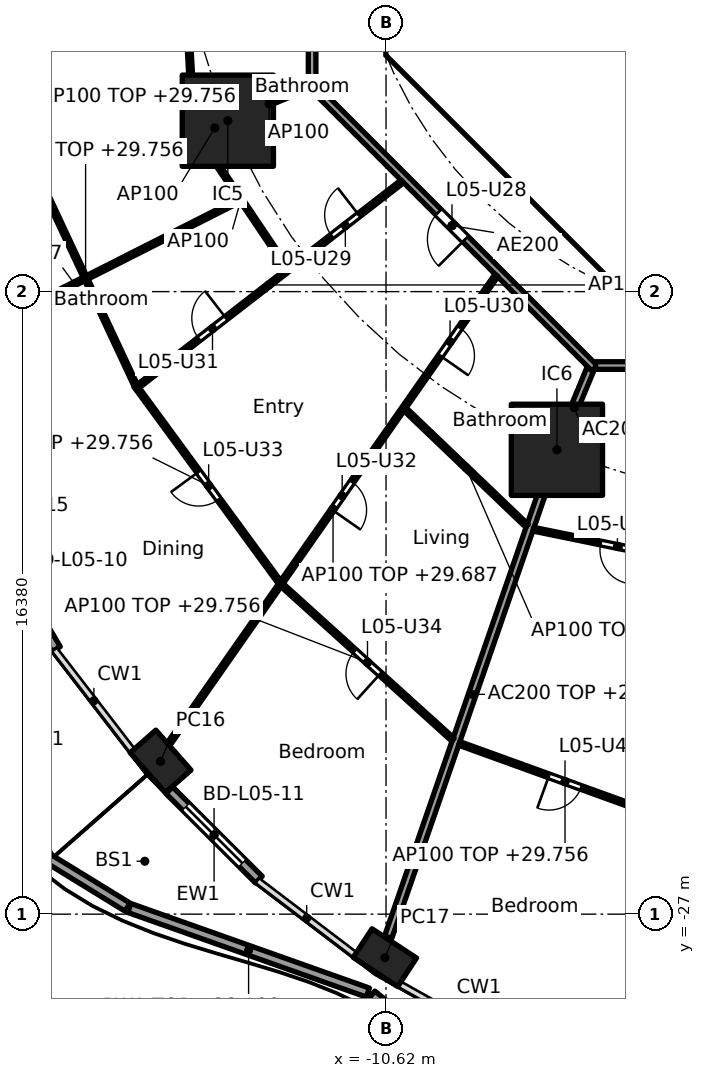
"""IFC4 building model, lengths in metres.
Left out: names, types, materials, properties, quantities, classifications, styles, units other than length and angle.
Written with IfcOpenShell. Run it as: python <this file> out.ifc"""

import sys

from ifc_helpers import new_model, si_unit, direction, frame, frame_2d, origin, origin_2d, place, context, subcontext, project, spatial, polyline, rectangle, hollow_rectangle, outline, extrude, element, fill, save


model = new_model("IFC4")
c1 = context("Model", 3, precision=1e-05, world=origin(), true_north=direction((0.0, 1.0)))
c2 = subcontext(c1, "Body", "Model", "MODEL_VIEW")
j1 = project(units=[si_unit("LENGTHUNIT", "METRE"), si_unit("PLANEANGLEUNIT", "RADIAN")], contexts=[c1])
p1 = place(None, origin())
s1 = spatial("IfcSite", under=j1, at=p1, CompositionType="ELEMENT")
p2 = place(p1, origin())
s2 = spatial("IfcBuilding", under=s1, at=p2, CompositionType="ELEMENT")
p3 = place(p2, frame((0.0, 0.0, 27.0)))
s3 = spatial("IfcBuildingStorey", under=s2, at=p3, CompositionType="ELEMENT", Elevation=27.0)
for number, where, z_axis, x_axis in (
    (1, (-16.552, -22.981, 0.0), (0.0, 0.0, 1.0), (0.66, -0.751, 0.0)),
    (2, (-10.65, -28.146, 0.0), (0.0, 0.0, 1.0), (0.836, -0.549, 0.0)),
):
    element("IfcColumn", number, at=place(p3, frame(where, z_axis=z_axis, x_axis=x_axis)), inside=s3, PredefinedType="COLUMN", context=c2, shape_type="SweptSolid", body=[
        extrude(hollow_rectangle(XDim=1.4, YDim=0.9, WallThickness=0.05, at=origin_2d()), origin(), (0.0, 0.0, 1.0), 3.7),
    ])
for number, where, z_axis, x_axis in (
    (3, (-14.782, -6.123, 0.0), (0.0, 0.0, 1.0), (1.0, 0.0, 0.0)),
    (4, (-6.123, -14.782, 0.0), (0.0, 0.0, 1.0), (1.0, 0.0, 0.0)),
):
    element("IfcColumn", number, at=place(p3, frame(where, z_axis=z_axis, x_axis=x_axis)), inside=s3, PredefinedType="COLUMN", context=c2, shape_type="SweptSolid", body=[
        extrude(rectangle(XDim=2.4, YDim=2.4, at=origin_2d()), origin(), (0.0, 0.0, 1.0), 3.7),
    ])
p4 = place(p3, frame((-19.3, -20.026, 0.0), z_axis=(0.0, 0.0, 1.0), x_axis=(-0.506311160839, 0.862350861546, 0.0)))
e5 = element("IfcWall", 5, at=p4, inside=s3, PredefinedType="SOLIDWALL", context=c2, shape_type="SweptSolid", body=[
    extrude(rectangle(XDim=3.462, YDim=0.25, at=frame_2d((1.731, 0.0))), origin(), (0.0, 0.0, 1.0), 3.44),
])
p5 = place(p4, frame((0.681, 0.0, 0.0)))
e6 = element("IfcOpeningElement", 6, at=p5, cuts=e5, PredefinedType="OPENING", context=c2, shape_type="SweptSolid", body=[
    extrude(rectangle(XDim=2.1, YDim=2.4, at=frame_2d((1.05, 1.2))), frame((0.0, 0.135, 0.0), z_axis=(0.0, -1.0, 0.0), x_axis=(1.0, 0.0, 0.0)), (0.0, 0.0, 1.0), 0.27),
])
p6 = place(p3, frame((-13.966, -26.092, 0.0), z_axis=(0.0, 0.0, 1.0), x_axis=(-0.707803094595, 0.706409781417, 0.0)))
e7 = element("IfcWall", 7, at=p6, inside=s3, PredefinedType="SOLIDWALL", context=c2, shape_type="SweptSolid", body=[
    extrude(rectangle(XDim=3.329, YDim=0.25, at=frame_2d((1.665, 0.0))), origin(), (0.0, 0.0, 1.0), 3.44),
])
p7 = place(p6, frame((0.615, 0.0, 0.0)))
e8 = element("IfcOpeningElement", 8, at=p7, cuts=e7, PredefinedType="OPENING", context=c2, shape_type="SweptSolid", body=[
    extrude(rectangle(XDim=2.1, YDim=2.4, at=frame_2d((1.05, 1.2))), frame((0.0, 0.135, 0.0), z_axis=(0.0, -1.0, 0.0), x_axis=(1.0, 0.0, 0.0)), (0.0, 0.0, 1.0), 0.27),
])
p8 = place(p3, frame((-21.34, -22.818, 0.0), z_axis=(0.0, 0.0, 1.0), x_axis=(0.56093486479, -0.827859938312, 0.0)))
e9 = element("IfcWall", 9, at=p8, inside=s3, PredefinedType="PARAPET", context=c2, shape_type="SweptSolid", body=[
    extrude(rectangle(XDim=3.299, YDim=0.25, at=frame_2d((1.649, 0.0))), origin(), (0.0, 0.0, 1.0), 1.1),
])
p9 = place(p3, frame((-19.491, -25.545, 0.0), z_axis=(0.0, 0.0, 1.0), x_axis=(0.852196394013, -0.523222042761, 0.0)))
e10 = element("IfcWall", 10, at=p9, inside=s3, PredefinedType="PARAPET", context=c2, shape_type="SweptSolid", body=[
    extrude(rectangle(XDim=2.428, YDim=0.25, at=frame_2d((1.214, 0.0))), origin(), (0.0, 0.0, 1.0), 1.1),
])
p10 = place(p3, frame((-17.373, -26.838, 0.0), z_axis=(0.0, 0.0, 1.0), x_axis=(0.94252427227, -0.334137690453, 0.0)))
e11 = element("IfcWall", 11, at=p10, inside=s3, PredefinedType="PARAPET", context=c2, shape_type="SweptSolid", body=[
    extrude(rectangle(XDim=6.657, YDim=0.25, at=frame_2d((3.329, 0.0))), origin(), (0.0, 0.0, 1.0), 1.1),
])
p11 = place(p3, frame((-10.993, -29.122, 0.0), z_axis=(0.0, 0.0, 1.0), x_axis=(0.777298307168, -0.62913221319, 0.0)))
e12 = element("IfcWall", 12, at=p11, inside=s3, PredefinedType="PARAPET", context=c2, shape_type="SweptSolid", body=[
    extrude(rectangle(XDim=3.937, YDim=0.25, at=frame_2d((1.968, 0.0))), origin(), (0.0, 0.0, 1.0), 1.1),
])
p12 = place(p3, frame((-9.988, -4.613, 0.0), z_axis=(0.0, 0.0, 1.0), x_axis=(0.707106781187, -0.707106781187, 0.0)))
e13 = element("IfcWall", 13, at=p12, inside=s3, PredefinedType="SHEAR", context=c2, shape_type="SweptSolid", body=[
    extrude(rectangle(XDim=7.602, YDim=0.6, at=frame_2d((3.801, 0.0))), origin(), (0.0, 0.0, 1.0), 3.44),
])
p13 = place(p12, frame((6.151, 0.0, 0.0)))
e14 = element("IfcOpeningElement", 14, at=p13, cuts=e13, PredefinedType="OPENING", context=c2, shape_type="SweptSolid", body=[
    extrude(rectangle(XDim=1.1, YDim=2.1, at=frame_2d((0.55, 1.05))), frame((0.0, 0.31, 0.0), z_axis=(0.0, -1.0, 0.0), x_axis=(1.0, 0.0, 0.0)), (0.0, 0.0, 1.0), 0.62),
])
p14 = place(p3, frame((-5.8, -8.227, 0.0), z_axis=(0.0, 0.0, 1.0), x_axis=(0.0, 1.0, 0.0)))
e15 = element("IfcWall", 15, at=p14, inside=s3, PredefinedType="PARTITIONING", context=c2, shape_type="SweptSolid", body=[
    extrude(rectangle(XDim=3.927, YDim=0.15, at=frame_2d((1.963, 0.0))), origin(), (0.0, 0.0, 1.0), 3.44),
])
p15 = place(p14, frame((2.615, 0.0, 0.0)))
e16 = element("IfcOpeningElement", 16, at=p15, cuts=e15, PredefinedType="OPENING", context=c2, shape_type="SweptSolid", body=[
    extrude(rectangle(XDim=0.9, YDim=2.1, at=frame_2d((0.45, 1.05))), frame((0.0, 0.085, 0.0), z_axis=(0.0, -1.0, 0.0), x_axis=(1.0, 0.0, 0.0)), (0.0, 0.0, 1.0), 0.17),
])
p16 = place(p14, frame((0.539, 0.0, 0.0)))
e17 = element("IfcOpeningElement", 17, at=p16, cuts=e15, PredefinedType="OPENING", context=c2, shape_type="SweptSolid", body=[
    extrude(rectangle(XDim=0.9, YDim=2.1, at=frame_2d((0.45, 1.05))), frame((0.0, 0.085, 0.0), z_axis=(0.0, -1.0, 0.0), x_axis=(1.0, 0.0, 0.0)), (0.0, 0.0, 1.0), 0.17),
])
p17 = place(p3, origin())
e18 = element("IfcWall", 18, at=p17, inside=s3, PredefinedType="SHEAR", context=c2, shape_type="SweptSolid", body=[
    extrude(outline(polyline([(-10.625, -3.801), (-10.025, -3.801), (-10.025, -4.152), (-9.776, -4.401), (-10.2, -4.825), (-10.625, -4.401), (-10.625, -3.801)])), origin(), (0.0, 0.0, 1.0), 3.44),
])
p18 = place(p3, origin())
e19 = element("IfcWall", 19, at=p18, inside=s3, PredefinedType="SHEAR", context=c2, shape_type="SweptSolid", body=[
    extrude(outline(polyline([(-4.152, -10.025), (4.152, -10.025), (4.401, -9.776), (4.825, -10.2), (4.401, -10.625), (-4.401, -10.625), (-4.825, -10.2), (-4.401, -9.776), (-4.152, -10.025)])), origin(), (0.0, 0.0, 1.0), 3.44),
])
p19 = place(p3, frame((-8.001, -6.1, 0.0), z_axis=(0.0, 0.0, 1.0), x_axis=(1.0, 0.0, 0.0)))
e20 = element("IfcWall", 20, at=p19, inside=s3, PredefinedType="PARTITIONING", context=c2, shape_type="SweptSolid", body=[
    extrude(rectangle(XDim=2.126, YDim=0.15, at=frame_2d((1.063, 0.0))), origin(), (0.0, 0.0, 1.0), 3.44),
])
p20 = place(p3, frame((-5.243, -12.657, 0.0), z_axis=(0.0, 0.0, 1.0), x_axis=(-0.382668627144, -0.923885664896, 0.0)))
e21 = element("IfcWall", 21, at=p20, inside=s3, PredefinedType="PARTITIONING", context=c2, shape_type="SweptSolid", body=[
    extrude(rectangle(XDim=2.2, YDim=0.2, at=frame_2d((1.1, 0.0))), origin(), (0.0, 0.0, 1.0), 3.44),
])
p21 = place(p3, frame((-6.139, -14.829, 0.0), z_axis=(0.0, 0.0, 1.0), x_axis=(-0.327178799566, -0.944962450637, 0.0)))
e22 = element("IfcWall", 22, at=p21, inside=s3, PredefinedType="PARTITIONING", context=c2, shape_type="SweptSolid", body=[
    extrude(rectangle(XDim=13.517, YDim=0.2, at=frame_2d((6.759, 0.0))), origin(), (0.0, 0.0, 1.0), 2.756),
])
p22 = place(p3, frame((-12.565, 5.304, 0.0), z_axis=(0.0, 0.0, 1.0), x_axis=(0.0, -1.0, 0.0)))
e23 = element("IfcWall", 23, at=p22, inside=s3, PredefinedType="PARTITIONING", context=c2, shape_type="SweptSolid", body=[
    extrude(rectangle(XDim=10.409, YDim=0.2, at=frame_2d((5.205, 0.0))), origin(), (0.0, 0.0, 1.0), 3.44),
])
p23 = place(p3, frame((-12.635, -5.134, 0.0), z_axis=(0.0, 0.0, 1.0), x_axis=(0.707106781187, -0.707106781187, 0.0)))
e24 = element("IfcWall", 24, at=p23, inside=s3, PredefinedType="PARTITIONING", context=c2, shape_type="SweptSolid", body=[
    extrude(rectangle(XDim=10.609, YDim=0.2, at=frame_2d((5.305, 0.0))), origin(), (0.0, 0.0, 1.0), 3.44),
])
p24 = place(p23, frame((4.804, 0.0, 0.0)))
e25 = element("IfcOpeningElement", 25, at=p24, cuts=e24, PredefinedType="OPENING", context=c2, shape_type="SweptSolid", body=[
    extrude(rectangle(XDim=1.0, YDim=2.1, at=frame_2d((0.5, 1.05))), frame((0.0, 0.11, 0.0), z_axis=(0.0, -1.0, 0.0), x_axis=(1.0, 0.0, 0.0)), (0.0, 0.0, 1.0), 0.22),
])
p25 = place(p3, frame((-5.104, -12.565, 0.0), z_axis=(0.0, 0.0, 1.0), x_axis=(1.0, 0.0, 0.0)))
e26 = element("IfcWall", 26, at=p25, inside=s3, PredefinedType="PARTITIONING", context=c2, shape_type="SweptSolid", body=[
    extrude(rectangle(XDim=10.409, YDim=0.2, at=frame_2d((5.205, 0.0))), origin(), (0.0, 0.0, 1.0), 3.44),
])
p26 = place(p25, frame((8.074, 0.0, 0.0)))
e27 = element("IfcOpeningElement", 27, at=p26, cuts=e26, PredefinedType="OPENING", context=c2, shape_type="SweptSolid", body=[
    extrude(rectangle(XDim=1.0, YDim=2.1, at=frame_2d((0.5, 1.05))), frame((0.0, 0.11, 0.0), z_axis=(0.0, -1.0, 0.0), x_axis=(1.0, 0.0, 0.0)), (0.0, 0.0, 1.0), 0.22),
])
p27 = place(p3, frame((-16.028, -0.05, 0.0), z_axis=(0.0, 0.0, 1.0), x_axis=(0.054636410342, -0.998506315786, 0.0)))
e28 = element("IfcWall", 28, at=p27, inside=s3, PredefinedType="PARTITIONING", context=c2, shape_type="SweptSolid", body=[
    extrude(rectangle(XDim=6.359, YDim=0.1, at=frame_2d((3.179, 0.0))), origin(), (0.0, 0.0, 1.0), 2.756),
])
p28 = place(p27, frame((2.704, 0.0, 0.0)))
e29 = element("IfcOpeningElement", 29, at=p28, cuts=e28, PredefinedType="OPENING", context=c2, shape_type="SweptSolid", body=[
    extrude(rectangle(XDim=0.9, YDim=2.1, at=frame_2d((0.45, 1.05))), frame((0.0, 0.06, 0.0), z_axis=(0.0, -1.0, 0.0), x_axis=(1.0, 0.0, 0.0)), (0.0, 0.0, 1.0), 0.12),
])
p29 = place(p3, frame((-12.657, -5.243, 0.0), z_axis=(0.0, 0.0, 1.0), x_axis=(-0.923864733477, -0.382719158442, 0.0)))
e30 = element("IfcWall", 30, at=p29, inside=s3, PredefinedType="PARTITIONING", context=c2, shape_type="SweptSolid", body=[
    extrude(rectangle(XDim=2.25, YDim=0.1, at=frame_2d((1.125, 0.0))), origin(), (0.0, 0.0, 1.0), 3.44),
])
p30 = place(p3, frame((-15.655, -6.391, 0.0), z_axis=(0.0, 0.0, 1.0), x_axis=(0.559126445155, -0.82908239538, 0.0)))
e31 = element("IfcWall", 31, at=p30, inside=s3, PredefinedType="PARTITIONING", context=c2, shape_type="SweptSolid", body=[
    extrude(rectangle(XDim=4.358, YDim=0.1, at=frame_2d((2.179, 0.0))), origin(), (0.0, 0.0, 1.0), 3.44),
])
p31 = place(p3, frame((-19.847, -7.445, 0.0), z_axis=(0.0, 0.0, 1.0), x_axis=(0.423892287987, -0.905712607942, 0.0)))
e32 = element("IfcWall", 32, at=p31, inside=s3, PredefinedType="PARTITIONING", context=c2, shape_type="SweptSolid", body=[
    extrude(rectangle(XDim=6.238, YDim=0.1, at=frame_2d((3.119, 0.0))), origin(), (0.0, 0.0, 1.0), 2.756),
])
p32 = place(p3, frame((-14.481, -8.22, 0.0), z_axis=(0.0, 0.0, 1.0), x_axis=(-0.892232077638, -0.451577146935, 0.0)))
e33 = element("IfcWall", 33, at=p32, inside=s3, PredefinedType="PARTITIONING", context=c2, shape_type="SweptSolid", body=[
    extrude(rectangle(XDim=9.723, YDim=0.1, at=frame_2d((4.862, 0.0))), origin(), (0.0, 0.0, 1.0), 2.837),
])
p33 = place(p32, frame((6.678, 0.0, 0.0)))
e34 = element("IfcOpeningElement", 34, at=p33, cuts=e33, PredefinedType="OPENING", context=c2, shape_type="SweptSolid", body=[
    extrude(rectangle(XDim=0.9, YDim=2.1, at=frame_2d((0.45, 1.05))), frame((0.0, 0.06, 0.0), z_axis=(0.0, -1.0, 0.0), x_axis=(1.0, 0.0, 0.0)), (0.0, 0.0, 1.0), 0.12),
])
p34 = place(p3, frame((-10.19, -7.719, 0.0), z_axis=(0.0, 0.0, 1.0), x_axis=(-0.790264549439, -0.612765813259, 0.0)))
e35 = element("IfcWall", 35, at=p34, inside=s3, PredefinedType="PARTITIONING", context=c2, shape_type="SweptSolid", body=[
    extrude(rectangle(XDim=8.896, YDim=0.1, at=frame_2d((4.448, 0.0))), origin(), (0.0, 0.0, 1.0), 2.687),
])
p35 = place(p34, frame((1.448, 0.0, 0.0)))
e36 = element("IfcOpeningElement", 36, at=p35, cuts=e35, PredefinedType="OPENING", context=c2, shape_type="SweptSolid", body=[
    extrude(rectangle(XDim=0.9, YDim=2.1, at=frame_2d((0.45, 1.05))), frame((0.0, 0.06, 0.0), z_axis=(0.0, -1.0, 0.0), x_axis=(1.0, 0.0, 0.0)), (0.0, 0.0, 1.0), 0.12),
])
p36 = place(p34, frame((5.871, 0.0, 0.0)))
e37 = element("IfcOpeningElement", 37, at=p36, cuts=e35, PredefinedType="OPENING", context=c2, shape_type="SweptSolid", body=[
    extrude(rectangle(XDim=0.9, YDim=2.1, at=frame_2d((0.45, 1.05))), frame((0.0, 0.06, 0.0), z_axis=(0.0, -1.0, 0.0), x_axis=(1.0, 0.0, 0.0)), (0.0, 0.0, 1.0), 0.12),
])
p37 = place(p3, frame((-17.152, -13.18, 0.0), z_axis=(0.0, 0.0, 1.0), x_axis=(0.591222750954, -0.806508312886, 0.0)))
e38 = element("IfcWall", 38, at=p37, inside=s3, PredefinedType="PARTITIONING", context=c2, shape_type="SweptSolid", body=[
    extrude(rectangle(XDim=6.31, YDim=0.1, at=frame_2d((3.155, 0.0))), origin(), (0.0, 0.0, 1.0), 2.756),
])
p38 = place(p37, frame((2.705, 0.0, 0.0)))
e39 = element("IfcOpeningElement", 39, at=p38, cuts=e38, PredefinedType="OPENING", context=c2, shape_type="SweptSolid", body=[
    extrude(rectangle(XDim=0.9, YDim=2.1, at=frame_2d((0.45, 1.05))), frame((0.0, 0.06, 0.0), z_axis=(0.0, -1.0, 0.0), x_axis=(1.0, 0.0, 0.0)), (0.0, 0.0, 1.0), 0.12),
])
p39 = place(p3, frame((-7.715, -10.193, 0.0), z_axis=(0.0, 0.0, 1.0), x_axis=(-0.573126964124, -0.819466584428, 0.0)))
e40 = element("IfcWall", 40, at=p39, inside=s3, PredefinedType="PARTITIONING", context=c2, shape_type="SweptSolid", body=[
    extrude(rectangle(XDim=15.001, YDim=0.1, at=frame_2d((7.5, 0.0))), origin(), (0.0, 0.0, 1.0), 2.687),
])
p40 = place(p39, frame((1.678, 0.0, 0.0)))
e41 = element("IfcOpeningElement", 41, at=p40, cuts=e40, PredefinedType="OPENING", context=c2, shape_type="SweptSolid", body=[
    extrude(rectangle(XDim=0.9, YDim=2.1, at=frame_2d((0.45, 1.05))), frame((0.0, 0.06, 0.0), z_axis=(0.0, -1.0, 0.0), x_axis=(1.0, 0.0, 0.0)), (0.0, 0.0, 1.0), 0.12),
])
p41 = place(p39, frame((6.631, 0.0, 0.0)))
e42 = element("IfcOpeningElement", 42, at=p41, cuts=e40, PredefinedType="OPENING", context=c2, shape_type="SweptSolid", body=[
    extrude(rectangle(XDim=0.9, YDim=2.1, at=frame_2d((0.45, 1.05))), frame((0.0, 0.06, 0.0), z_axis=(0.0, -1.0, 0.0), x_axis=(1.0, 0.0, 0.0)), (0.0, 0.0, 1.0), 0.12),
])
p42 = place(p3, frame((-10.119, -13.716, 0.0), z_axis=(0.0, 0.0, 1.0), x_axis=(0.722775679202, -0.691082713975, 0.0)))
e43 = element("IfcWall", 43, at=p42, inside=s3, PredefinedType="PARTITIONING", context=c2, shape_type="SweptSolid", body=[
    extrude(rectangle(XDim=4.437, YDim=0.1, at=frame_2d((2.219, 0.0))), origin(), (0.0, 0.0, 1.0), 2.756),
])
p43 = place(p3, frame((-13.355, -18.343, 0.0), z_axis=(0.0, 0.0, 1.0), x_axis=(0.741713303551, -0.670717060567, 0.0)))
e44 = element("IfcWall", 44, at=p43, inside=s3, PredefinedType="PARTITIONING", context=c2, shape_type="SweptSolid", body=[
    extrude(rectangle(XDim=6.059, YDim=0.1, at=frame_2d((3.03, 0.0))), origin(), (0.0, 0.0, 1.0), 2.756),
])
p44 = place(p43, frame((2.58, 0.0, 0.0)))
e45 = element("IfcOpeningElement", 45, at=p44, cuts=e44, PredefinedType="OPENING", context=c2, shape_type="SweptSolid", body=[
    extrude(rectangle(XDim=0.9, YDim=2.1, at=frame_2d((0.45, 1.05))), frame((0.0, 0.06, 0.0), z_axis=(0.0, -1.0, 0.0), x_axis=(1.0, 0.0, 0.0)), (0.0, 0.0, 1.0), 0.12),
])
p45 = place(p3, frame((-6.741, -16.872, 0.0), z_axis=(0.0, 0.0, 1.0), x_axis=(0.979595137747, -0.200981009307, 0.0)))
e46 = element("IfcWall", 46, at=p45, inside=s3, PredefinedType="PARTITIONING", context=c2, shape_type="SweptSolid", body=[
    extrude(rectangle(XDim=4.562, YDim=0.1, at=frame_2d((2.281, 0.0))), origin(), (0.0, 0.0, 1.0), 2.756),
])
p46 = place(p45, frame((1.806, 0.0, 0.0)))
e47 = element("IfcOpeningElement", 47, at=p46, cuts=e46, PredefinedType="OPENING", context=c2, shape_type="SweptSolid", body=[
    extrude(rectangle(XDim=0.9, YDim=2.1, at=frame_2d((0.45, 1.05))), frame((0.0, 0.06, 0.0), z_axis=(0.0, -1.0, 0.0), x_axis=(1.0, 0.0, 0.0)), (0.0, 0.0, 1.0), 0.12),
])
p47 = place(p3, frame((-8.692, -22.508, 0.0), z_axis=(0.0, 0.0, 1.0), x_axis=(0.940401494588, -0.340066212636, 0.0)))
e48 = element("IfcWall", 48, at=p47, inside=s3, PredefinedType="PARTITIONING", context=c2, shape_type="SweptSolid", body=[
    extrude(rectangle(XDim=5.917, YDim=0.1, at=frame_2d((2.958, 0.0))), origin(), (0.0, 0.0, 1.0), 2.756),
])
p48 = place(p47, frame((2.509, 0.0, 0.0)))
e49 = element("IfcOpeningElement", 49, at=p48, cuts=e48, PredefinedType="OPENING", context=c2, shape_type="SweptSolid", body=[
    extrude(rectangle(XDim=0.9, YDim=2.1, at=frame_2d((0.45, 1.05))), frame((0.0, 0.06, 0.0), z_axis=(0.0, -1.0, 0.0), x_axis=(1.0, 0.0, 0.0)), (0.0, 0.0, 1.0), 0.12),
])
p49 = place(p3, frame((-15.469, -6.398, 0.0), z_axis=(0.0, 0.0, 1.0), x_axis=(0.969858002632, 0.243670791706, 0.0)))
e50 = element("IfcWall", 50, at=p49, inside=s3, PredefinedType="PARTITIONING", context=c2, shape_type="SweptSolid", body=[
    extrude(rectangle(XDim=0.708, YDim=0.1, at=frame_2d((0.354, 0.0))), origin(), (0.0, 0.0, 1.0), 3.44),
])
p50 = place(p7, origin())
e51 = element("IfcDoor", 51, at=p50, inside=s3, OperationType="SLIDING_TO_LEFT", PredefinedType="DOOR", context=c2, shape_type="SweptSolid", body=[
    extrude(rectangle(XDim=2.1, YDim=2.4, at=frame_2d((1.05, 1.2))), frame((0.0, 0.025, 0.0), z_axis=(0.0, -1.0, 0.0), x_axis=(1.0, 0.0, 0.0)), (0.0, 0.0, 1.0), 0.05),
])
fill(e8, e51)
p51 = place(p15, origin())
e52 = element("IfcDoor", 52, at=p51, inside=s3, OperationType="SINGLE_SWING_LEFT", PredefinedType="DOOR", context=c2, shape_type="SweptSolid", body=[
    extrude(rectangle(XDim=0.9, YDim=2.1, at=frame_2d((0.45, 1.05))), frame((0.0, 0.025, 0.0), z_axis=(0.0, -1.0, 0.0), x_axis=(1.0, 0.0, 0.0)), (0.0, 0.0, 1.0), 0.05),
])
fill(e16, e52)
p52 = place(p16, origin())
e53 = element("IfcDoor", 53, at=p52, inside=s3, OperationType="SINGLE_SWING_LEFT", PredefinedType="DOOR", context=c2, shape_type="SweptSolid", body=[
    extrude(rectangle(XDim=0.9, YDim=2.1, at=frame_2d((0.45, 1.05))), frame((0.0, 0.025, 0.0), z_axis=(0.0, -1.0, 0.0), x_axis=(1.0, 0.0, 0.0)), (0.0, 0.0, 1.0), 0.05),
])
fill(e17, e53)
p53 = place(p13, origin())
e54 = element("IfcDoor", 54, at=p53, inside=s3, OperationType="SINGLE_SWING_LEFT", PredefinedType="DOOR", context=c2, shape_type="SweptSolid", body=[
    extrude(rectangle(XDim=1.1, YDim=2.1, at=frame_2d((0.55, 1.05))), frame((0.0, 0.025, 0.0), z_axis=(0.0, -1.0, 0.0), x_axis=(1.0, 0.0, 0.0)), (0.0, 0.0, 1.0), 0.05),
])
fill(e14, e54)
p54 = place(p24, frame((1.0, 0.0, 0.0), x_axis=(-1.0, 0.0, 0.0)))
e55 = element("IfcDoor", 55, at=p54, inside=s3, OperationType="SINGLE_SWING_LEFT", PredefinedType="DOOR", context=c2, shape_type="SweptSolid", body=[
    extrude(rectangle(XDim=1.0, YDim=2.1, at=frame_2d((0.5, 1.05))), frame((0.0, 0.025, 0.0), z_axis=(0.0, -1.0, 0.0), x_axis=(1.0, 0.0, 0.0)), (0.0, 0.0, 1.0), 0.05),
])
fill(e25, e55)
p55 = place(p35, frame((0.9, 0.0, 0.0), x_axis=(-1.0, 0.0, 0.0)))
e56 = element("IfcDoor", 56, at=p55, inside=s3, OperationType="SINGLE_SWING_RIGHT", PredefinedType="DOOR", context=c2, shape_type="SweptSolid", body=[
    extrude(rectangle(XDim=0.9, YDim=2.1, at=frame_2d((0.45, 1.05))), frame((0.0, 0.025, 0.0), z_axis=(0.0, -1.0, 0.0), x_axis=(1.0, 0.0, 0.0)), (0.0, 0.0, 1.0), 0.05),
])
fill(e36, e56)
p56 = place(p40, origin())
e57 = element("IfcDoor", 57, at=p56, inside=s3, OperationType="SINGLE_SWING_RIGHT", PredefinedType="DOOR", context=c2, shape_type="SweptSolid", body=[
    extrude(rectangle(XDim=0.9, YDim=2.1, at=frame_2d((0.45, 1.05))), frame((0.0, 0.025, 0.0), z_axis=(0.0, -1.0, 0.0), x_axis=(1.0, 0.0, 0.0)), (0.0, 0.0, 1.0), 0.05),
])
fill(e41, e57)
p57 = place(p36, frame((0.9, 0.0, 0.0), x_axis=(-1.0, 0.0, 0.0)))
e58 = element("IfcDoor", 58, at=p57, inside=s3, OperationType="SINGLE_SWING_RIGHT", PredefinedType="DOOR", context=c2, shape_type="SweptSolid", body=[
    extrude(rectangle(XDim=0.9, YDim=2.1, at=frame_2d((0.45, 1.05))), frame((0.0, 0.025, 0.0), z_axis=(0.0, -1.0, 0.0), x_axis=(1.0, 0.0, 0.0)), (0.0, 0.0, 1.0), 0.05),
])
fill(e37, e58)
p58 = place(p41, origin())
e59 = element("IfcDoor", 59, at=p58, inside=s3, OperationType="SINGLE_SWING_RIGHT", PredefinedType="DOOR", context=c2, shape_type="SweptSolid", body=[
    extrude(rectangle(XDim=0.9, YDim=2.1, at=frame_2d((0.45, 1.05))), frame((0.0, 0.025, 0.0), z_axis=(0.0, -1.0, 0.0), x_axis=(1.0, 0.0, 0.0)), (0.0, 0.0, 1.0), 0.05),
])
fill(e42, e59)
p59 = place(p38, frame((0.9, 0.0, 0.0), x_axis=(-1.0, 0.0, 0.0)))
e60 = element("IfcDoor", 60, at=p59, inside=s3, OperationType="SINGLE_SWING_RIGHT", PredefinedType="DOOR", context=c2, shape_type="SweptSolid", body=[
    extrude(rectangle(XDim=0.9, YDim=2.1, at=frame_2d((0.45, 1.05))), frame((0.0, 0.025, 0.0), z_axis=(0.0, -1.0, 0.0), x_axis=(1.0, 0.0, 0.0)), (0.0, 0.0, 1.0), 0.05),
])
fill(e39, e60)
p60 = place(p44, frame((0.9, 0.0, 0.0), x_axis=(-1.0, 0.0, 0.0)))
e61 = element("IfcDoor", 61, at=p60, inside=s3, OperationType="SINGLE_SWING_LEFT", PredefinedType="DOOR", context=c2, shape_type="SweptSolid", body=[
    extrude(rectangle(XDim=0.9, YDim=2.1, at=frame_2d((0.45, 1.05))), frame((0.0, 0.025, 0.0), z_axis=(0.0, -1.0, 0.0), x_axis=(1.0, 0.0, 0.0)), (0.0, 0.0, 1.0), 0.05),
])
fill(e45, e61)
p61 = place(p46, frame((0.9, 0.0, 0.0), x_axis=(-1.0, 0.0, 0.0)))
e62 = element("IfcDoor", 62, at=p61, inside=s3, OperationType="SINGLE_SWING_LEFT", PredefinedType="DOOR", context=c2, shape_type="SweptSolid", body=[
    extrude(rectangle(XDim=0.9, YDim=2.1, at=frame_2d((0.45, 1.05))), frame((0.0, 0.025, 0.0), z_axis=(0.0, -1.0, 0.0), x_axis=(1.0, 0.0, 0.0)), (0.0, 0.0, 1.0), 0.05),
])
fill(e47, e62)
p62 = place(p48, frame((0.9, 0.0, 0.0), x_axis=(-1.0, 0.0, 0.0)))
e63 = element("IfcDoor", 63, at=p62, inside=s3, OperationType="SINGLE_SWING_RIGHT", PredefinedType="DOOR", context=c2, shape_type="SweptSolid", body=[
    extrude(rectangle(XDim=0.9, YDim=2.1, at=frame_2d((0.45, 1.05))), frame((0.0, 0.025, 0.0), z_axis=(0.0, -1.0, 0.0), x_axis=(1.0, 0.0, 0.0)), (0.0, 0.0, 1.0), 0.05),
])
fill(e49, e63)
save(model, sys.argv[1])
